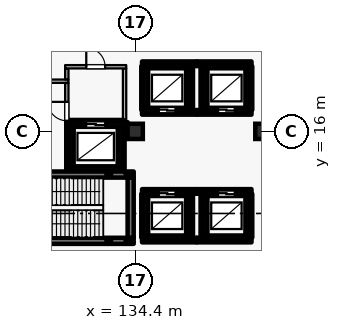
"""IFC4 building model, lengths in metres.
Left out: names, types, materials, properties, quantities, classifications, styles, units other than length and angle.
Written with IfcOpenShell. Run it as: python <this file> out.ifc"""

import sys

from ifc_helpers import new_model, si_unit, direction, frame, frame_2d, origin, origin_2d, place, context, subcontext, project, spatial, rectangle, hollow_rectangle, extrude, element, fill, save


model = new_model("IFC4")
c1 = context("Model", 3, precision=1e-05, world=origin(), true_north=direction((0.0, 1.0)))
c2 = subcontext(c1, "Body", "Model", "MODEL_VIEW")
j1 = project(units=[si_unit("LENGTHUNIT", "METRE"), si_unit("PLANEANGLEUNIT", "RADIAN")], contexts=[c1])
p1 = place(None, origin())
s1 = spatial("IfcSite", under=j1, at=p1, CompositionType="ELEMENT")
p2 = place(p1, origin())
s2 = spatial("IfcBuilding", under=s1, at=p2, CompositionType="ELEMENT")
p3 = place(p2, frame((0.0, 0.0, -5.4)))
s3 = spatial("IfcBuildingStorey", under=s2, at=p3, CompositionType="ELEMENT", Elevation=-5.4)
for number, where, z_axis, x_axis in (
    (1, (134.4, 16.0, 0.0), (0.0, 0.0, 1.0), (1.0, 0.0, 0.0)),
    (2, (142.8, 16.0, 0.0), (0.0, 0.0, 1.0), (1.0, 0.0, 0.0)),
):
    element("IfcColumn", number, at=place(p3, frame(where, z_axis=z_axis, x_axis=x_axis)), inside=s3, PredefinedType="COLUMN", context=c2, shape_type="SweptSolid", body=[
        extrude(rectangle(XDim=1.0, YDim=1.0, at=origin_2d()), origin(), (0.0, 0.0, 1.0), 5.4),
    ])
p4 = place(p3, frame((134.85, 17.25, -1.4), z_axis=(0.0, 0.0, 1.0), x_axis=(1.0, 0.0, 0.0)))
e3 = element("IfcWall", 3, at=p4, inside=s3, PredefinedType="USERDEFINED", context=c2, shape_type="SweptSolid", body=[
    extrude(rectangle(XDim=3.6, YDim=0.3, at=frame_2d((1.8, 0.0))), origin(), (0.0, 0.0, 1.0), 1.4),
])
p5 = place(p3, frame((138.05, 17.41, -1.4), z_axis=(0.0, 0.0, 1.0), x_axis=(0.0, 1.0, 0.0)))
e4 = element("IfcWall", 4, at=p5, inside=s3, PredefinedType="USERDEFINED", context=c2, shape_type="SweptSolid", body=[
    extrude(rectangle(XDim=2.88, YDim=0.3, at=frame_2d((1.44, 0.0))), origin(), (0.0, 0.0, 1.0), 1.4),
])
p6 = place(p3, frame((138.45, 20.45, -1.4), z_axis=(0.0, 0.0, 1.0), x_axis=(-1.0, 0.0, 0.0)))
e5 = element("IfcWall", 5, at=p6, inside=s3, PredefinedType="USERDEFINED", context=c2, shape_type="SweptSolid", body=[
    extrude(rectangle(XDim=3.6, YDim=0.3, at=frame_2d((1.8, 0.0))), origin(), (0.0, 0.0, 1.0), 1.4),
])
p7 = place(p3, frame((134.95, 20.29, -1.4), z_axis=(0.0, 0.0, 1.0), x_axis=(0.0, -1.0, 0.0)))
e6 = element("IfcWall", 6, at=p7, inside=s3, PredefinedType="USERDEFINED", context=c2, shape_type="SweptSolid", body=[
    extrude(rectangle(XDim=2.88, YDim=0.3, at=frame_2d((1.44, 0.0))), origin(), (0.0, 0.0, 1.0), 1.4),
])
p8 = place(p3, frame((138.45, 17.25, -1.4), z_axis=(0.0, 0.0, 1.0), x_axis=(1.0, 0.0, 0.0)))
e7 = element("IfcWall", 7, at=p8, inside=s3, PredefinedType="USERDEFINED", context=c2, shape_type="SweptSolid", body=[
    extrude(rectangle(XDim=3.6, YDim=0.3, at=frame_2d((1.8, 0.0))), origin(), (0.0, 0.0, 1.0), 1.4),
])
p9 = place(p3, frame((141.95, 17.41, -1.4), z_axis=(0.0, 0.0, 1.0), x_axis=(0.0, 1.0, 0.0)))
e8 = element("IfcWall", 8, at=p9, inside=s3, PredefinedType="USERDEFINED", context=c2, shape_type="SweptSolid", body=[
    extrude(rectangle(XDim=2.88, YDim=0.3, at=frame_2d((1.44, 0.0))), origin(), (0.0, 0.0, 1.0), 1.4),
])
p10 = place(p3, frame((142.05, 20.45, -1.4), z_axis=(0.0, 0.0, 1.0), x_axis=(-1.0, 0.0, 0.0)))
e9 = element("IfcWall", 9, at=p10, inside=s3, PredefinedType="USERDEFINED", context=c2, shape_type="SweptSolid", body=[
    extrude(rectangle(XDim=3.6, YDim=0.3, at=frame_2d((1.8, 0.0))), origin(), (0.0, 0.0, 1.0), 1.4),
])
p11 = place(p3, frame((138.85, 20.29, -1.4), z_axis=(0.0, 0.0, 1.0), x_axis=(0.0, -1.0, 0.0)))
e10 = element("IfcWall", 10, at=p11, inside=s3, PredefinedType="USERDEFINED", context=c2, shape_type="SweptSolid", body=[
    extrude(rectangle(XDim=2.88, YDim=0.3, at=frame_2d((1.44, 0.0))), origin(), (0.0, 0.0, 1.0), 1.4),
])
p12 = place(p3, frame((134.85, 8.85, -1.4), z_axis=(0.0, 0.0, 1.0), x_axis=(1.0, 0.0, 0.0)))
e11 = element("IfcWall", 11, at=p12, inside=s3, PredefinedType="USERDEFINED", context=c2, shape_type="SweptSolid", body=[
    extrude(rectangle(XDim=3.6, YDim=0.3, at=frame_2d((1.8, 0.0))), origin(), (0.0, 0.0, 1.0), 1.4),
])
p13 = place(p3, frame((138.05, 9.01, -1.4), z_axis=(0.0, 0.0, 1.0), x_axis=(0.0, 1.0, 0.0)))
e12 = element("IfcWall", 12, at=p13, inside=s3, PredefinedType="USERDEFINED", context=c2, shape_type="SweptSolid", body=[
    extrude(rectangle(XDim=2.88, YDim=0.3, at=frame_2d((1.44, 0.0))), origin(), (0.0, 0.0, 1.0), 1.4),
])
p14 = place(p3, frame((138.45, 12.05, -1.4), z_axis=(0.0, 0.0, 1.0), x_axis=(-1.0, 0.0, 0.0)))
e13 = element("IfcWall", 13, at=p14, inside=s3, PredefinedType="USERDEFINED", context=c2, shape_type="SweptSolid", body=[
    extrude(rectangle(XDim=3.6, YDim=0.3, at=frame_2d((1.8, 0.0))), origin(), (0.0, 0.0, 1.0), 1.4),
])
p15 = place(p3, frame((134.95, 11.89, -1.4), z_axis=(0.0, 0.0, 1.0), x_axis=(0.0, -1.0, 0.0)))
e14 = element("IfcWall", 14, at=p15, inside=s3, PredefinedType="USERDEFINED", context=c2, shape_type="SweptSolid", body=[
    extrude(rectangle(XDim=2.88, YDim=0.3, at=frame_2d((1.44, 0.0))), origin(), (0.0, 0.0, 1.0), 1.4),
])
p16 = place(p3, frame((138.45, 8.85, -1.4), z_axis=(0.0, 0.0, 1.0), x_axis=(1.0, 0.0, 0.0)))
e15 = element("IfcWall", 15, at=p16, inside=s3, PredefinedType="USERDEFINED", context=c2, shape_type="SweptSolid", body=[
    extrude(rectangle(XDim=3.6, YDim=0.3, at=frame_2d((1.8, 0.0))), origin(), (0.0, 0.0, 1.0), 1.4),
])
p17 = place(p3, frame((141.95, 9.01, -1.4), z_axis=(0.0, 0.0, 1.0), x_axis=(0.0, 1.0, 0.0)))
e16 = element("IfcWall", 16, at=p17, inside=s3, PredefinedType="USERDEFINED", context=c2, shape_type="SweptSolid", body=[
    extrude(rectangle(XDim=2.88, YDim=0.3, at=frame_2d((1.44, 0.0))), origin(), (0.0, 0.0, 1.0), 1.4),
])
p18 = place(p3, frame((142.05, 12.05, -1.4), z_axis=(0.0, 0.0, 1.0), x_axis=(-1.0, 0.0, 0.0)))
e17 = element("IfcWall", 17, at=p18, inside=s3, PredefinedType="USERDEFINED", context=c2, shape_type="SweptSolid", body=[
    extrude(rectangle(XDim=3.6, YDim=0.3, at=frame_2d((1.8, 0.0))), origin(), (0.0, 0.0, 1.0), 1.4),
])
p19 = place(p3, frame((138.85, 11.89, -1.4), z_axis=(0.0, 0.0, 1.0), x_axis=(0.0, -1.0, 0.0)))
e18 = element("IfcWall", 18, at=p19, inside=s3, PredefinedType="USERDEFINED", context=c2, shape_type="SweptSolid", body=[
    extrude(rectangle(XDim=2.88, YDim=0.3, at=frame_2d((1.44, 0.0))), origin(), (0.0, 0.0, 1.0), 1.4),
])
p20 = place(p3, frame((129.95, 13.4, -1.4), z_axis=(0.0, 0.0, 1.0), x_axis=(1.0, 0.0, 0.0)))
e19 = element("IfcWall", 19, at=p20, inside=s3, PredefinedType="USERDEFINED", context=c2, shape_type="SweptSolid", body=[
    extrude(rectangle(XDim=3.7, YDim=0.3, at=frame_2d((1.85, 0.0))), origin(), (0.0, 0.0, 1.0), 1.4),
])
p21 = place(p3, frame((133.55, 13.56, -1.4), z_axis=(0.0, 0.0, 1.0), x_axis=(0.0, 1.0, 0.0)))
e20 = element("IfcWall", 20, at=p21, inside=s3, PredefinedType="USERDEFINED", context=c2, shape_type="SweptSolid", body=[
    extrude(rectangle(XDim=2.88, YDim=0.3, at=frame_2d((1.44, 0.0))), origin(), (0.0, 0.0, 1.0), 1.4),
])
p22 = place(p3, frame((133.65, 16.6, -1.4), z_axis=(0.0, 0.0, 1.0), x_axis=(-1.0, 0.0, 0.0)))
e21 = element("IfcWall", 21, at=p22, inside=s3, PredefinedType="USERDEFINED", context=c2, shape_type="SweptSolid", body=[
    extrude(rectangle(XDim=3.7, YDim=0.3, at=frame_2d((1.85, 0.0))), origin(), (0.0, 0.0, 1.0), 1.4),
])
p23 = place(p3, frame((130.05, 16.44, -1.4), z_axis=(0.0, 0.0, 1.0), x_axis=(0.0, -1.0, 0.0)))
e22 = element("IfcWall", 22, at=p23, inside=s3, PredefinedType="USERDEFINED", context=c2, shape_type="SweptSolid", body=[
    extrude(rectangle(XDim=2.88, YDim=0.3, at=frame_2d((1.44, 0.0))), origin(), (0.0, 0.0, 1.0), 1.4),
])
p24 = place(p3, frame((134.95, 17.4, 0.0), z_axis=(0.0, 0.0, 1.0), x_axis=(1.0, 0.0, 0.0)))
e23 = element("IfcWall", 23, at=p24, inside=s3, PredefinedType="SHEAR", context=c2, shape_type="SweptSolid", body=[
    extrude(rectangle(XDim=3.1, YDim=0.3, at=frame_2d((1.55, 0.0))), origin(), (0.0, 0.0, 1.0), 4.995),
])
p25 = place(p24, frame((1.0, 0.0, 0.0)))
e24 = element("IfcOpeningElement", 24, at=p25, cuts=e23, PredefinedType="OPENING", context=c2, shape_type="SweptSolid", body=[
    extrude(rectangle(XDim=1.1, YDim=2.2, at=frame_2d((0.55, 1.1))), frame((0.0, 0.16, 0.0), z_axis=(0.0, -1.0, 0.0), x_axis=(1.0, 0.0, 0.0)), (0.0, 0.0, 1.0), 0.32),
])
p26 = place(p3, frame((137.9, 17.555, 0.0), z_axis=(0.0, 0.0, 1.0), x_axis=(0.0, 1.0, 0.0)))
e25 = element("IfcWall", 25, at=p26, inside=s3, PredefinedType="SHEAR", context=c2, shape_type="SweptSolid", body=[
    extrude(rectangle(XDim=2.59, YDim=0.3, at=frame_2d((1.295, 0.0))), origin(), (0.0, 0.0, 1.0), 4.995),
])
p27 = place(p3, frame((138.05, 20.3, 0.0), z_axis=(0.0, 0.0, 1.0), x_axis=(-1.0, 0.0, 0.0)))
e26 = element("IfcWall", 26, at=p27, inside=s3, PredefinedType="SHEAR", context=c2, shape_type="SweptSolid", body=[
    extrude(rectangle(XDim=3.1, YDim=0.3, at=frame_2d((1.55, 0.0))), origin(), (0.0, 0.0, 1.0), 4.995),
])
p28 = place(p3, frame((135.1, 20.145, 0.0), z_axis=(0.0, 0.0, 1.0), x_axis=(0.0, -1.0, 0.0)))
e27 = element("IfcWall", 27, at=p28, inside=s3, PredefinedType="SHEAR", context=c2, shape_type="SweptSolid", body=[
    extrude(rectangle(XDim=2.59, YDim=0.3, at=frame_2d((1.295, 0.0))), origin(), (0.0, 0.0, 1.0), 4.995),
])
p29 = place(p3, frame((138.85, 17.4, 0.0), z_axis=(0.0, 0.0, 1.0), x_axis=(1.0, 0.0, 0.0)))
e28 = element("IfcWall", 28, at=p29, inside=s3, PredefinedType="SHEAR", context=c2, shape_type="SweptSolid", body=[
    extrude(rectangle(XDim=3.1, YDim=0.3, at=frame_2d((1.55, 0.0))), origin(), (0.0, 0.0, 1.0), 4.995),
])
p30 = place(p29, frame((1.0, 0.0, 0.0)))
e29 = element("IfcOpeningElement", 29, at=p30, cuts=e28, PredefinedType="OPENING", context=c2, shape_type="SweptSolid", body=[
    extrude(rectangle(XDim=1.1, YDim=2.2, at=frame_2d((0.55, 1.1))), frame((0.0, 0.16, 0.0), z_axis=(0.0, -1.0, 0.0), x_axis=(1.0, 0.0, 0.0)), (0.0, 0.0, 1.0), 0.32),
])
p31 = place(p3, frame((141.8, 17.555, 0.0), z_axis=(0.0, 0.0, 1.0), x_axis=(0.0, 1.0, 0.0)))
e30 = element("IfcWall", 30, at=p31, inside=s3, PredefinedType="SHEAR", context=c2, shape_type="SweptSolid", body=[
    extrude(rectangle(XDim=2.59, YDim=0.3, at=frame_2d((1.295, 0.0))), origin(), (0.0, 0.0, 1.0), 4.995),
])
p32 = place(p3, frame((141.95, 20.3, 0.0), z_axis=(0.0, 0.0, 1.0), x_axis=(-1.0, 0.0, 0.0)))
e31 = element("IfcWall", 31, at=p32, inside=s3, PredefinedType="SHEAR", context=c2, shape_type="SweptSolid", body=[
    extrude(rectangle(XDim=3.1, YDim=0.3, at=frame_2d((1.55, 0.0))), origin(), (0.0, 0.0, 1.0), 4.995),
])
p33 = place(p3, frame((139.0, 20.145, 0.0), z_axis=(0.0, 0.0, 1.0), x_axis=(0.0, -1.0, 0.0)))
e32 = element("IfcWall", 32, at=p33, inside=s3, PredefinedType="SHEAR", context=c2, shape_type="SweptSolid", body=[
    extrude(rectangle(XDim=2.59, YDim=0.3, at=frame_2d((1.295, 0.0))), origin(), (0.0, 0.0, 1.0), 4.995),
])
p34 = place(p3, frame((134.95, 9.0, 0.0), z_axis=(0.0, 0.0, 1.0), x_axis=(1.0, 0.0, 0.0)))
e33 = element("IfcWall", 33, at=p34, inside=s3, PredefinedType="SHEAR", context=c2, shape_type="SweptSolid", body=[
    extrude(rectangle(XDim=3.1, YDim=0.3, at=frame_2d((1.55, 0.0))), origin(), (0.0, 0.0, 1.0), 4.995),
])
p35 = place(p3, frame((137.9, 9.155, 0.0), z_axis=(0.0, 0.0, 1.0), x_axis=(0.0, 1.0, 0.0)))
e34 = element("IfcWall", 34, at=p35, inside=s3, PredefinedType="SHEAR", context=c2, shape_type="SweptSolid", body=[
    extrude(rectangle(XDim=2.59, YDim=0.3, at=frame_2d((1.295, 0.0))), origin(), (0.0, 0.0, 1.0), 4.995),
])
p36 = place(p3, frame((138.05, 11.9, 0.0), z_axis=(0.0, 0.0, 1.0), x_axis=(-1.0, 0.0, 0.0)))
e35 = element("IfcWall", 35, at=p36, inside=s3, PredefinedType="SHEAR", context=c2, shape_type="SweptSolid", body=[
    extrude(rectangle(XDim=3.1, YDim=0.3, at=frame_2d((1.55, 0.0))), origin(), (0.0, 0.0, 1.0), 4.995),
])
p37 = place(p36, frame((1.0, 0.0, 0.0)))
e36 = element("IfcOpeningElement", 36, at=p37, cuts=e35, PredefinedType="OPENING", context=c2, shape_type="SweptSolid", body=[
    extrude(rectangle(XDim=1.1, YDim=2.2, at=frame_2d((0.55, 1.1))), frame((0.0, 0.16, 0.0), z_axis=(0.0, -1.0, 0.0), x_axis=(1.0, 0.0, 0.0)), (0.0, 0.0, 1.0), 0.32),
])
p38 = place(p3, frame((135.1, 11.745, 0.0), z_axis=(0.0, 0.0, 1.0), x_axis=(0.0, -1.0, 0.0)))
e37 = element("IfcWall", 37, at=p38, inside=s3, PredefinedType="SHEAR", context=c2, shape_type="SweptSolid", body=[
    extrude(rectangle(XDim=2.59, YDim=0.3, at=frame_2d((1.295, 0.0))), origin(), (0.0, 0.0, 1.0), 4.995),
])
p39 = place(p3, frame((138.85, 9.0, 0.0), z_axis=(0.0, 0.0, 1.0), x_axis=(1.0, 0.0, 0.0)))
e38 = element("IfcWall", 38, at=p39, inside=s3, PredefinedType="SHEAR", context=c2, shape_type="SweptSolid", body=[
    extrude(rectangle(XDim=3.1, YDim=0.3, at=frame_2d((1.55, 0.0))), origin(), (0.0, 0.0, 1.0), 4.995),
])
p40 = place(p3, frame((141.8, 9.155, 0.0), z_axis=(0.0, 0.0, 1.0), x_axis=(0.0, 1.0, 0.0)))
e39 = element("IfcWall", 39, at=p40, inside=s3, PredefinedType="SHEAR", context=c2, shape_type="SweptSolid", body=[
    extrude(rectangle(XDim=2.59, YDim=0.3, at=frame_2d((1.295, 0.0))), origin(), (0.0, 0.0, 1.0), 4.995),
])
p41 = place(p3, frame((141.95, 11.9, 0.0), z_axis=(0.0, 0.0, 1.0), x_axis=(-1.0, 0.0, 0.0)))
e40 = element("IfcWall", 40, at=p41, inside=s3, PredefinedType="SHEAR", context=c2, shape_type="SweptSolid", body=[
    extrude(rectangle(XDim=3.1, YDim=0.3, at=frame_2d((1.55, 0.0))), origin(), (0.0, 0.0, 1.0), 4.995),
])
p42 = place(p41, frame((1.0, 0.0, 0.0)))
e41 = element("IfcOpeningElement", 41, at=p42, cuts=e40, PredefinedType="OPENING", context=c2, shape_type="SweptSolid", body=[
    extrude(rectangle(XDim=1.1, YDim=2.2, at=frame_2d((0.55, 1.1))), frame((0.0, 0.16, 0.0), z_axis=(0.0, -1.0, 0.0), x_axis=(1.0, 0.0, 0.0)), (0.0, 0.0, 1.0), 0.32),
])
p43 = place(p3, frame((139.0, 11.745, 0.0), z_axis=(0.0, 0.0, 1.0), x_axis=(0.0, -1.0, 0.0)))
e42 = element("IfcWall", 42, at=p43, inside=s3, PredefinedType="SHEAR", context=c2, shape_type="SweptSolid", body=[
    extrude(rectangle(XDim=2.59, YDim=0.3, at=frame_2d((1.295, 0.0))), origin(), (0.0, 0.0, 1.0), 4.995),
])
p44 = place(p3, frame((130.05, 13.55, 0.0), z_axis=(0.0, 0.0, 1.0), x_axis=(1.0, 0.0, 0.0)))
e43 = element("IfcWall", 43, at=p44, inside=s3, PredefinedType="SHEAR", context=c2, shape_type="SweptSolid", body=[
    extrude(rectangle(XDim=3.5, YDim=0.3, at=frame_2d((1.75, 0.0))), origin(), (0.0, 0.0, 1.0), 4.995),
])
p45 = place(p3, frame((133.4, 13.705, 0.0), z_axis=(0.0, 0.0, 1.0), x_axis=(0.0, 1.0, 0.0)))
e44 = element("IfcWall", 44, at=p45, inside=s3, PredefinedType="SHEAR", context=c2, shape_type="SweptSolid", body=[
    extrude(rectangle(XDim=2.59, YDim=0.3, at=frame_2d((1.295, 0.0))), origin(), (0.0, 0.0, 1.0), 4.995),
])
p46 = place(p3, frame((133.91, 16.45, 0.0), z_axis=(0.0, 0.0, 1.0), x_axis=(-1.0, 0.0, 0.0)))
e45 = element("IfcWall", 45, at=p46, inside=s3, PredefinedType="SHEAR", context=c2, shape_type="SweptSolid", body=[
    extrude(rectangle(XDim=3.86, YDim=0.3, at=frame_2d((1.93, 0.0))), origin(), (0.0, 0.0, 1.0), 4.995),
])
p47 = place(p46, frame((1.485, 0.0, 0.0)))
e46 = element("IfcOpeningElement", 46, at=p47, cuts=e45, PredefinedType="OPENING", context=c2, shape_type="SweptSolid", body=[
    extrude(rectangle(XDim=1.25, YDim=2.25, at=frame_2d((0.625, 1.125))), frame((0.0, 0.16, 0.0), z_axis=(0.0, -1.0, 0.0), x_axis=(1.0, 0.0, 0.0)), (0.0, 0.0, 1.0), 0.32),
])
p48 = place(p3, frame((130.2, 16.295, 0.0), z_axis=(0.0, 0.0, 1.0), x_axis=(0.0, -1.0, 0.0)))
e47 = element("IfcWall", 47, at=p48, inside=s3, PredefinedType="SHEAR", context=c2, shape_type="SweptSolid", body=[
    extrude(rectangle(XDim=2.59, YDim=0.3, at=frame_2d((1.295, 0.0))), origin(), (0.0, 0.0, 1.0), 4.995),
])
p49 = place(p3, frame((126.1, 8.8, 0.0), z_axis=(0.0, 0.0, 1.0), x_axis=(1.0, 0.0, 0.0)))
e48 = element("IfcWall", 48, at=p49, inside=s3, PredefinedType="SHEAR", context=c2, shape_type="SweptSolid", body=[
    extrude(rectangle(XDim=8.2, YDim=0.4, at=frame_2d((4.1, 0.0))), origin(), (0.0, 0.0, 1.0), 4.995),
])
p50 = place(p3, frame((134.1, 9.005, 0.0), z_axis=(0.0, 0.0, 1.0), x_axis=(0.0, 1.0, 0.0)))
e49 = element("IfcWall", 49, at=p50, inside=s3, PredefinedType="SHEAR", context=c2, shape_type="SweptSolid", body=[
    extrude(rectangle(XDim=3.95, YDim=0.4, at=frame_2d((1.975, 0.0))), origin(), (0.0, 0.0, 1.0), 4.995),
])
p51 = place(p3, frame((126.1, 13.16, 0.0), z_axis=(0.0, 0.0, 1.0), x_axis=(1.0, 0.0, 0.0)))
e50 = element("IfcWall", 50, at=p51, inside=s3, PredefinedType="SHEAR", context=c2, shape_type="SweptSolid", body=[
    extrude(rectangle(XDim=8.2, YDim=0.4, at=frame_2d((4.1, 0.0))), origin(), (0.0, 0.0, 1.0), 4.995),
])
p52 = place(p51, frame((0.43, 0.0, 0.0)))
e51 = element("IfcOpeningElement", 51, at=p52, cuts=e50, PredefinedType="OPENING", context=c2, shape_type="SweptSolid", body=[
    extrude(rectangle(XDim=1.16, YDim=2.2, at=frame_2d((0.58, 1.1))), frame((0.0, 0.21, 0.0), z_axis=(0.0, -1.0, 0.0), x_axis=(1.0, 0.0, 0.0)), (0.0, 0.0, 1.0), 0.42),
])
p53 = place(p3, frame((126.19, 19.3, 0.0), z_axis=(0.0, 0.0, 1.0), x_axis=(1.0, 0.0, 0.0)))
e52 = element("IfcWall", 52, at=p53, inside=s3, PredefinedType="PARTITIONING", context=c2, shape_type="SweptSolid", body=[
    extrude(rectangle(XDim=3.82, YDim=0.22, at=frame_2d((1.91, 0.0))), origin(), (0.0, 0.0, 1.0), 4.995),
])
p54 = place(p53, frame((1.35, 0.0, 0.0)))
e53 = element("IfcOpeningElement", 53, at=p54, cuts=e52, PredefinedType="OPENING", context=c2, shape_type="SweptSolid", body=[
    extrude(rectangle(XDim=1.12, YDim=2.2, at=frame_2d((0.56, 1.1))), frame((0.0, 0.12, 0.0), z_axis=(0.0, -1.0, 0.0), x_axis=(1.0, 0.0, 0.0)), (0.0, 0.0, 1.0), 0.24),
])
p55 = place(p3, frame((129.9, 13.365, 0.0), z_axis=(0.0, 0.0, 1.0), x_axis=(0.0, 1.0, 0.0)))
e54 = element("IfcWall", 54, at=p55, inside=s3, PredefinedType="PARTITIONING", context=c2, shape_type="SweptSolid", body=[
    extrude(rectangle(XDim=5.82, YDim=0.22, at=frame_2d((2.91, 0.0))), origin(), (0.0, 0.0, 1.0), 4.995),
])
p56 = place(p55, frame((3.335, 0.0, 0.0)))
e55 = element("IfcOpeningElement", 55, at=p56, cuts=e54, PredefinedType="OPENING", context=c2, shape_type="SweptSolid", body=[
    extrude(rectangle(XDim=1.24, YDim=2.2, at=frame_2d((0.62, 1.1))), frame((0.0, 0.12, 0.0), z_axis=(0.0, -1.0, 0.0), x_axis=(1.0, 0.0, 0.0)), (0.0, 0.0, 1.0), 0.24),
])
p57 = place(p3, frame((129.9, 19.415, 0.0), z_axis=(0.0, 0.0, 1.0), x_axis=(0.0, 1.0, 0.0)))
e56 = element("IfcWall", 56, at=p57, inside=s3, PredefinedType="PARTITIONING", context=c2, shape_type="SweptSolid", body=[
    extrude(rectangle(XDim=0.72, YDim=0.22, at=frame_2d((0.36, 0.0))), origin(), (0.0, 0.0, 1.0), 4.995),
])
p58 = place(p3, frame((133.7, 16.605, 0.0), z_axis=(0.0, 0.0, 1.0), x_axis=(0.0, 1.0, 0.0)))
e57 = element("IfcWall", 57, at=p58, inside=s3, PredefinedType="PARTITIONING", context=c2, shape_type="SweptSolid", body=[
    extrude(rectangle(XDim=3.53, YDim=0.22, at=frame_2d((1.765, 0.0))), origin(), (0.0, 0.0, 1.0), 4.995),
])
p59 = place(p3, frame((129.79, 20.25, 0.0), z_axis=(0.0, 0.0, 1.0), x_axis=(1.0, 0.0, 0.0)))
e58 = element("IfcWall", 58, at=p59, inside=s3, PredefinedType="PARTITIONING", context=c2, shape_type="SweptSolid", body=[
    extrude(rectangle(XDim=4.02, YDim=0.22, at=frame_2d((2.01, 0.0))), origin(), (0.0, 0.0, 1.0), 4.995),
])
p60 = place(p59, frame((1.39, 0.0, 0.0)))
e59 = element("IfcOpeningElement", 59, at=p60, cuts=e58, PredefinedType="OPENING", context=c2, shape_type="SweptSolid", body=[
    extrude(rectangle(XDim=1.24, YDim=2.2, at=frame_2d((0.62, 1.1))), frame((0.0, 0.12, 0.0), z_axis=(0.0, -1.0, 0.0), x_axis=(1.0, 0.0, 0.0)), (0.0, 0.0, 1.0), 0.24),
])
for number, where, z_axis, x_axis in (
    (60, (132.66, 8.8, 0.0), (0.0, 0.0, 1.0), (1.0, 0.0, 0.0)),
    (61, (132.66, 13.16, 0.0), (0.0, 0.0, 1.0), (1.0, 0.0, 0.0)),
    (62, (133.92, 8.8, 0.0), (0.0, 0.0, 1.0), (1.0, 0.0, 0.0)),
    (63, (133.92, 13.16, 0.0), (0.0, 0.0, 1.0), (1.0, 0.0, 0.0)),
):
    element("IfcColumn", number, at=place(p3, frame(where, z_axis=z_axis, x_axis=x_axis)), inside=s3, PredefinedType="COLUMN", context=c2, shape_type="SweptSolid", body=[
        extrude(hollow_rectangle(XDim=0.3, YDim=0.3, WallThickness=0.012, at=origin_2d()), origin(), (0.0, 0.0, 1.0), 2.52),
    ])
p61 = place(p25, origin())
e64 = element("IfcDoor", 64, at=p61, inside=s3, OperationType="DOUBLE_DOOR_SLIDING", PredefinedType="DOOR", context=c2, shape_type="SweptSolid", body=[
    extrude(rectangle(XDim=1.1, YDim=2.2, at=frame_2d((0.55, 1.1))), frame((0.0, 0.025, 0.0), z_axis=(0.0, -1.0, 0.0), x_axis=(1.0, 0.0, 0.0)), (0.0, 0.0, 1.0), 0.05),
])
fill(e24, e64)
p62 = place(p30, origin())
e65 = element("IfcDoor", 65, at=p62, inside=s3, OperationType="DOUBLE_DOOR_SLIDING", PredefinedType="DOOR", context=c2, shape_type="SweptSolid", body=[
    extrude(rectangle(XDim=1.1, YDim=2.2, at=frame_2d((0.55, 1.1))), frame((0.0, 0.025, 0.0), z_axis=(0.0, -1.0, 0.0), x_axis=(1.0, 0.0, 0.0)), (0.0, 0.0, 1.0), 0.05),
])
fill(e29, e65)
p63 = place(p37, origin())
e66 = element("IfcDoor", 66, at=p63, inside=s3, OperationType="DOUBLE_DOOR_SLIDING", PredefinedType="DOOR", context=c2, shape_type="SweptSolid", body=[
    extrude(rectangle(XDim=1.1, YDim=2.2, at=frame_2d((0.55, 1.1))), frame((0.0, 0.025, 0.0), z_axis=(0.0, -1.0, 0.0), x_axis=(1.0, 0.0, 0.0)), (0.0, 0.0, 1.0), 0.05),
])
fill(e36, e66)
p64 = place(p42, origin())
e67 = element("IfcDoor", 67, at=p64, inside=s3, OperationType="DOUBLE_DOOR_SLIDING", PredefinedType="DOOR", context=c2, shape_type="SweptSolid", body=[
    extrude(rectangle(XDim=1.1, YDim=2.2, at=frame_2d((0.55, 1.1))), frame((0.0, 0.025, 0.0), z_axis=(0.0, -1.0, 0.0), x_axis=(1.0, 0.0, 0.0)), (0.0, 0.0, 1.0), 0.05),
])
fill(e41, e67)
p65 = place(p47, origin())
e68 = element("IfcDoor", 68, at=p65, inside=s3, OperationType="DOUBLE_DOOR_SLIDING", PredefinedType="DOOR", context=c2, shape_type="SweptSolid", body=[
    extrude(rectangle(XDim=1.25, YDim=2.25, at=frame_2d((0.625, 1.125))), frame((0.0, 0.025, 0.0), z_axis=(0.0, -1.0, 0.0), x_axis=(1.0, 0.0, 0.0)), (0.0, 0.0, 1.0), 0.05),
])
fill(e46, e68)
p66 = place(p56, origin())
e69 = element("IfcDoor", 69, at=p66, inside=s3, OperationType="SINGLE_SWING_RIGHT", PredefinedType="DOOR", context=c2, shape_type="SweptSolid", body=[
    extrude(rectangle(XDim=1.24, YDim=2.2, at=frame_2d((0.62, 1.1))), frame((0.0, 0.025, 0.0), z_axis=(0.0, -1.0, 0.0), x_axis=(1.0, 0.0, 0.0)), (0.0, 0.0, 1.0), 0.05),
])
fill(e55, e69)
p67 = place(p60, origin())
e70 = element("IfcDoor", 70, at=p67, inside=s3, OperationType="SINGLE_SWING_LEFT", PredefinedType="DOOR", context=c2, shape_type="SweptSolid", body=[
    extrude(rectangle(XDim=1.24, YDim=2.2, at=frame_2d((0.62, 1.1))), frame((0.0, 0.025, 0.0), z_axis=(0.0, -1.0, 0.0), x_axis=(1.0, 0.0, 0.0)), (0.0, 0.0, 1.0), 0.05),
])
fill(e59, e70)
save(model, sys.argv[1])
